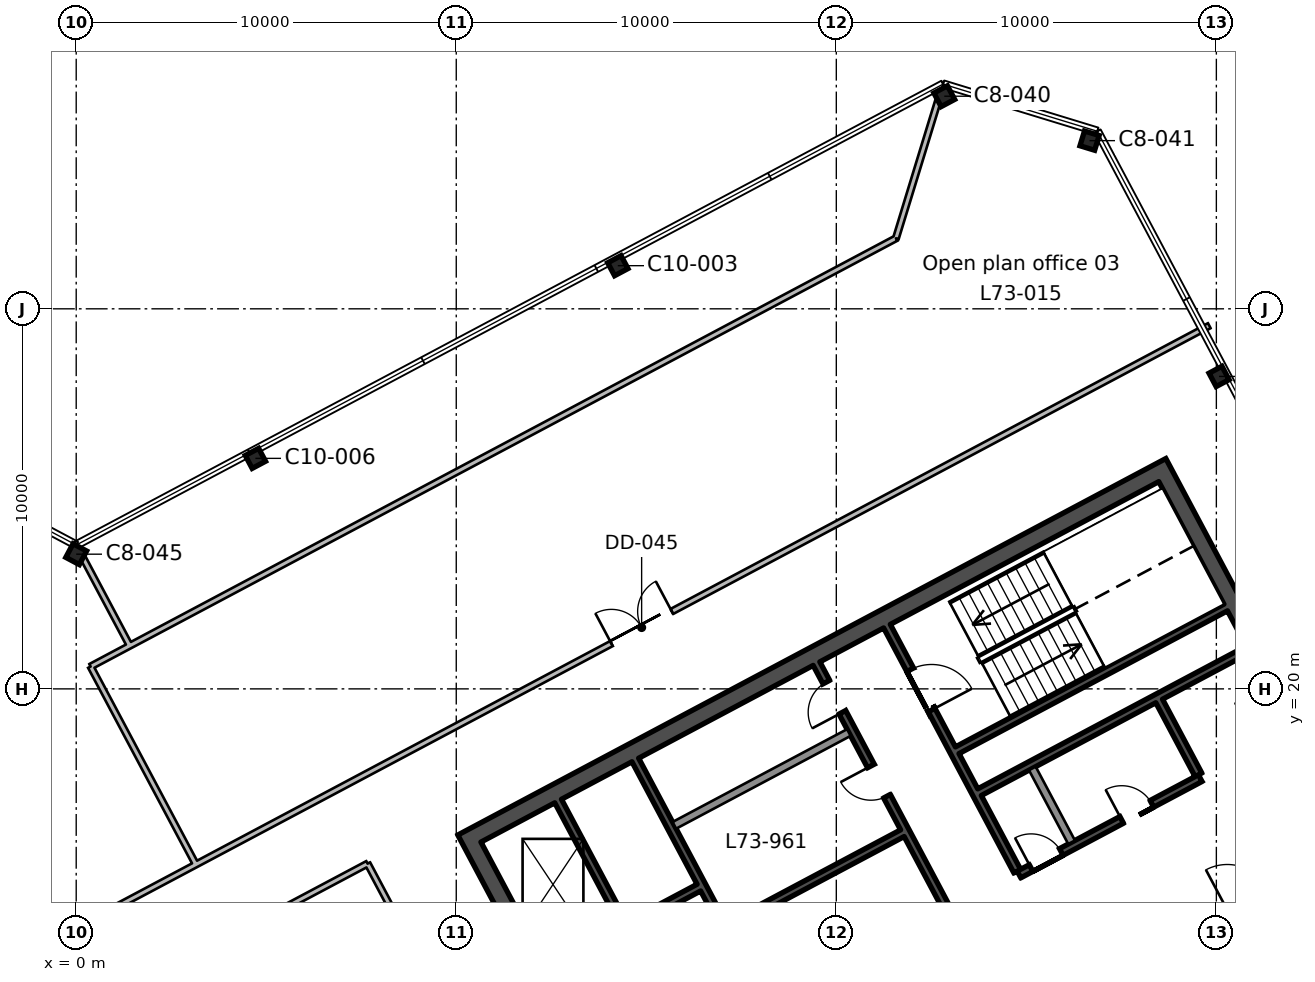
"""IFC4 building model, lengths in metres.
Left out: names, types, materials, properties, quantities, classifications, styles, units other than length and angle.
Written with IfcOpenShell. Run it as: python <this file> out.ifc"""

import sys

from ifc_helpers import new_model, si_unit, direction, frame, frame_2d, origin, origin_2d, place, context, subcontext, project, spatial, rectangle, i_section, extrude, element, fill, save


model = new_model("IFC4")
c1 = context("Model", 3, precision=1e-05, world=origin(), true_north=direction((0.0, 1.0)))
c2 = subcontext(c1, "Body", "Model", "MODEL_VIEW")
j1 = project(units=[si_unit("LENGTHUNIT", "METRE"), si_unit("PLANEANGLEUNIT", "RADIAN")], contexts=[c1])
p1 = place(None, origin())
s1 = spatial("IfcSite", under=j1, at=p1, CompositionType="ELEMENT")
p2 = place(p1, origin())
s2 = spatial("IfcBuilding", under=s1, at=p2, CompositionType="ELEMENT")
p3 = place(p2, frame((0.0, 0.0, 320.4)))
s3 = spatial("IfcBuildingStorey", under=s2, at=p3, CompositionType="ELEMENT", Elevation=320.4)
p4 = place(p3, frame((0.0, 23.544, 0.0), z_axis=(0.0, 0.0, 1.0), x_axis=(-0.882947592859, 0.469471562786, 0.0)))
e1 = element("IfcColumn", 1, at=p4, inside=s3, PredefinedType="COLUMN", context=c2, shape_type="SweptSolid", body=[
    extrude(i_section(OverallWidth=0.404, OverallDepth=0.406, WebThickness=0.027, FlangeThickness=0.044, FilletRadius=0.015, at=origin_2d()), origin(), (0.0, 0.0, 1.0), 3.9),
])
for number, where, z_axis, x_axis in (
    (2, (4.715, 26.065, 0.0), (0.0, 0.0, 1.0), (-0.883, -0.469, 0.0)),
    (3, (30.071, 28.221, 0.0), (0.0, 0.0, 1.0), (-0.469, 0.883, 0.0)),
    (4, (14.251, 31.135, 0.0), (0.0, 0.0, 1.0), (-0.883, -0.469, 0.0)),
):
    element("IfcColumn", number, at=place(p3, frame(where, z_axis=z_axis, x_axis=x_axis)), inside=s3, PredefinedType="COLUMN", context=c2, shape_type="SweptSolid", body=[
        extrude(i_section(OverallWidth=0.399, OverallDepth=0.386, WebThickness=0.021, FlangeThickness=0.033, FilletRadius=0.015, at=origin_2d()), origin(), (0.0, 0.0, 1.0), 3.9),
    ])
for number, where, z_axis, x_axis in (
    (5, (26.664, 34.425, 0.0), (0.0, 0.0, 1.0), (-0.956, 0.292, 0.0)),
    (6, (22.841, 35.594, 0.0), (0.0, 0.0, 1.0), (-0.883, -0.469, 0.0)),
):
    element("IfcColumn", number, at=place(p3, frame(where, z_axis=z_axis, x_axis=x_axis)), inside=s3, PredefinedType="COLUMN", context=c2, shape_type="SweptSolid", body=[
        extrude(i_section(OverallWidth=0.404, OverallDepth=0.406, WebThickness=0.027, FlangeThickness=0.044, FilletRadius=0.015, at=origin_2d()), origin(), (0.0, 0.0, 1.0), 3.9),
    ])
p5 = place(p3, frame((19.207, -0.604, 0.0), z_axis=(0.0, 0.0, 1.0), x_axis=(-0.469467968382, 0.882949504028, 0.0)))
e7 = element("IfcWall", 7, at=p5, inside=s3, PredefinedType="SHEAR", context=c2, shape_type="SweptSolid", body=[
    extrude(rectangle(XDim=19.1, YDim=0.45, at=frame_2d((9.55, 0.0))), origin(), (0.0, 0.0, 1.0), 3.9),
])
p6 = place(p5, frame((6.55, 0.0, 0.0)))
e8 = element("IfcOpeningElement", 8, at=p6, cuts=e7, PredefinedType="OPENING", context=c2, shape_type="SweptSolid", body=[
    extrude(rectangle(XDim=2.4, YDim=2.4, at=frame_2d((1.2, 1.2))), frame((0.0, 0.235, 0.0), z_axis=(0.0, -1.0, 0.0), x_axis=(1.0, 0.0, 0.0)), (0.0, 0.0, 1.0), 0.47),
])
p7 = place(p3, frame((37.439, 9.091, 0.0), z_axis=(0.0, 0.0, 1.0), x_axis=(-0.469467968382, 0.882949504028, 0.0)))
e9 = element("IfcWall", 9, at=p7, inside=s3, PredefinedType="SHEAR", context=c2, shape_type="SweptSolid", body=[
    extrude(rectangle(XDim=19.1, YDim=0.45, at=frame_2d((9.55, 0.0))), origin(), (0.0, 0.0, 1.0), 3.9),
])
p8 = place(p7, frame((10.15, 0.0, 0.0)))
e10 = element("IfcOpeningElement", 10, at=p8, cuts=e9, PredefinedType="OPENING", context=c2, shape_type="SweptSolid", body=[
    extrude(rectangle(XDim=2.4, YDim=2.4, at=frame_2d((1.2, 1.2))), frame((0.0, 0.235, 0.0), z_axis=(0.0, -1.0, 0.0), x_axis=(1.0, 0.0, 0.0)), (0.0, 0.0, 1.0), 0.47),
])
p9 = place(p3, frame((10.544, 16.167, 0.0), z_axis=(0.0, 0.0, 1.0), x_axis=(0.882947755831, 0.46947125628, 0.0)))
e11 = element("IfcWall", 11, at=p9, inside=s3, PredefinedType="SHEAR", context=c2, shape_type="SweptSolid", body=[
    extrude(rectangle(XDim=20.2, YDim=0.45, at=frame_2d((10.1, 0.0))), origin(), (0.0, 0.0, 1.0), 3.9),
])
p10 = place(p3, frame((14.394, 13.826, 0.0), z_axis=(0.0, 0.0, 1.0), x_axis=(-0.469494272526, 0.882935517501, 0.0)))
e12 = element("IfcWall", 12, at=p10, inside=s3, PredefinedType="SHEAR", context=c2, shape_type="SweptSolid", body=[
    extrude(rectangle(XDim=3.65, YDim=0.2, at=frame_2d((1.825, 0.0))), origin(), (0.0, 0.0, 1.0), 3.9),
])
p11 = place(p3, frame((18.138, 11.683, 0.0), z_axis=(0.0, 0.0, 1.0), x_axis=(-0.469480409012, 0.88294288918, 0.0)))
e13 = element("IfcWall", 13, at=p11, inside=s3, PredefinedType="SHEAR", context=c2, shape_type="SweptSolid", body=[
    extrude(rectangle(XDim=7.3, YDim=0.2, at=frame_2d((3.65, 0.0))), origin(), (0.0, 0.0, 1.0), 3.9),
])
p12 = place(p3, frame((19.569, 12.444, 0.0), z_axis=(0.0, 0.0, 1.0), x_axis=(-0.4694473164, 0.882960484464, 0.0)))
e14 = element("IfcWall", 14, at=p12, inside=s3, PredefinedType="SOLIDWALL", context=c2, shape_type="SweptSolid", body=[
    extrude(rectangle(XDim=2.2, YDim=0.2, at=frame_2d((1.1, 0.0))), origin(), (0.0, 0.0, 1.0), 3.9),
])
p13 = place(p3, frame((22.906, 14.218, 0.0), z_axis=(0.0, 0.0, 1.0), x_axis=(-0.469480409012, 0.88294288918, 0.0)))
e15 = element("IfcWall", 15, at=p13, inside=s3, PredefinedType="SHEAR", context=c2, shape_type="SweptSolid", body=[
    extrude(rectangle(XDim=7.3, YDim=0.2, at=frame_2d((3.65, 0.0))), origin(), (0.0, 0.0, 1.0), 3.9),
])
p14 = place(p13, frame((3.35, 0.0, 0.0)))
e16 = element("IfcOpeningElement", 16, at=p14, cuts=e15, PredefinedType="OPENING", context=c2, shape_type="SweptSolid", body=[
    extrude(rectangle(XDim=0.9, YDim=2.1, at=frame_2d((0.45, 1.05))), frame((0.0, 0.11, 0.0), z_axis=(0.0, -1.0, 0.0), x_axis=(1.0, 0.0, 0.0)), (0.0, 0.0, 1.0), 0.22),
])
p15 = place(p13, frame((5.85, 0.0, 0.0)))
e17 = element("IfcOpeningElement", 17, at=p15, cuts=e15, PredefinedType="OPENING", context=c2, shape_type="SweptSolid", body=[
    extrude(rectangle(XDim=0.9, YDim=2.1, at=frame_2d((0.45, 1.05))), frame((0.0, 0.11, 0.0), z_axis=(0.0, -1.0, 0.0), x_axis=(1.0, 0.0, 0.0)), (0.0, 0.0, 1.0), 0.22),
])
p16 = place(p3, frame((24.76, 15.204, 0.0), z_axis=(0.0, 0.0, 1.0), x_axis=(-0.469494272526, 0.882935517501, 0.0)))
e18 = element("IfcWall", 18, at=p16, inside=s3, PredefinedType="SHEAR", context=c2, shape_type="SweptSolid", body=[
    extrude(rectangle(XDim=7.3, YDim=0.2, at=frame_2d((3.65, 0.0))), origin(), (0.0, 0.0, 1.0), 3.9),
])
p17 = place(p16, frame((4.8, 0.0, 0.0)))
e19 = element("IfcOpeningElement", 19, at=p17, cuts=e18, PredefinedType="OPENING", context=c2, shape_type="SweptSolid", body=[
    extrude(rectangle(XDim=1.2, YDim=2.1, at=frame_2d((0.6, 1.05))), frame((0.0, 0.11, 0.0), z_axis=(0.0, -1.0, 0.0), x_axis=(1.0, 0.0, 0.0)), (0.0, 0.0, 1.0), 0.22),
])
p18 = place(p3, frame((26.191, 15.965, 0.0), z_axis=(0.0, 0.0, 1.0), x_axis=(-0.469533832133, 0.882914480843, 0.0)))
e20 = element("IfcWall", 20, at=p18, inside=s3, PredefinedType="SOLIDWALL", context=c2, shape_type="SweptSolid", body=[
    extrude(rectangle(XDim=2.2, YDim=0.2, at=frame_2d((1.1, 0.0))), origin(), (0.0, 0.0, 1.0), 3.9),
])
p19 = place(p3, frame((29.528, 17.739, 0.0), z_axis=(0.0, 0.0, 1.0), x_axis=(-0.469401318492, 0.882984938828, 0.0)))
e21 = element("IfcWall", 21, at=p19, inside=s3, PredefinedType="SHEAR", context=c2, shape_type="SweptSolid", body=[
    extrude(rectangle(XDim=2.2, YDim=0.2, at=frame_2d((1.1, 0.0))), origin(), (0.0, 0.0, 1.0), 3.9),
])
p20 = place(p3, frame((24.726, 11.222, 0.0), z_axis=(0.0, 0.0, 1.0), x_axis=(0.882940221191, 0.469485426614, 0.0)))
e22 = element("IfcWall", 22, at=p20, inside=s3, PredefinedType="SHEAR", context=c2, shape_type="SweptSolid", body=[
    extrude(rectangle(XDim=10.0, YDim=0.2, at=frame_2d((5.0, 0.0))), origin(), (0.0, 0.0, 1.0), 3.9),
])
p21 = place(p20, frame((6.3, 0.0, 0.0)))
e23 = element("IfcOpeningElement", 23, at=p21, cuts=e22, PredefinedType="OPENING", context=c2, shape_type="SweptSolid", body=[
    extrude(rectangle(XDim=1.2, YDim=2.1, at=frame_2d((0.6, 1.05))), frame((0.0, 0.11, 0.0), z_axis=(0.0, -1.0, 0.0), x_axis=(1.0, 0.0, 0.0)), (0.0, 0.0, 1.0), 0.22),
])
p22 = place(p20, frame((0.36, 0.0, 0.0)))
e24 = element("IfcOpeningElement", 24, at=p22, cuts=e22, PredefinedType="OPENING", context=c2, shape_type="SweptSolid", body=[
    extrude(rectangle(XDim=0.9, YDim=2.1, at=frame_2d((0.45, 1.05))), frame((0.0, 0.11, 0.0), z_axis=(0.0, -1.0, 0.0), x_axis=(1.0, 0.0, 0.0)), (0.0, 0.0, 1.0), 0.22),
])
p23 = place(p20, frame((3.06, 0.0, 0.0)))
e25 = element("IfcOpeningElement", 25, at=p23, cuts=e22, PredefinedType="OPENING", context=c2, shape_type="SweptSolid", body=[
    extrude(rectangle(XDim=0.9, YDim=2.1, at=frame_2d((0.45, 1.05))), frame((0.0, 0.11, 0.0), z_axis=(0.0, -1.0, 0.0), x_axis=(1.0, 0.0, 0.0)), (0.0, 0.0, 1.0), 0.22),
])
p24 = place(p3, frame((24.807, 15.116, 0.0), z_axis=(0.0, 0.0, 1.0), x_axis=(0.882942972946, 0.469480251476, 0.0)))
e26 = element("IfcWall", 26, at=p24, inside=s3, PredefinedType="SHEAR", context=c2, shape_type="SweptSolid", body=[
    extrude(rectangle(XDim=5.4, YDim=0.2, at=frame_2d((2.7, 0.0))), origin(), (0.0, 0.0, 1.0), 3.9),
])
p25 = place(p24, frame((0.36, 0.0, 0.0)))
e27 = element("IfcOpeningElement", 27, at=p25, cuts=e26, PredefinedType="OPENING", context=c2, shape_type="SweptSolid", body=[
    extrude(rectangle(XDim=0.9, YDim=2.1, at=frame_2d((0.45, 1.05))), frame((0.0, 0.11, 0.0), z_axis=(0.0, -1.0, 0.0), x_axis=(1.0, 0.0, 0.0)), (0.0, 0.0, 1.0), 0.22),
])
p26 = place(p24, frame((3.06, 0.0, 0.0)))
e28 = element("IfcOpeningElement", 28, at=p26, cuts=e26, PredefinedType="OPENING", context=c2, shape_type="SweptSolid", body=[
    extrude(rectangle(XDim=0.9, YDim=2.1, at=frame_2d((0.45, 1.05))), frame((0.0, 0.11, 0.0), z_axis=(0.0, -1.0, 0.0), x_axis=(1.0, 0.0, 0.0)), (0.0, 0.0, 1.0), 0.22),
])
p27 = place(p3, frame((17.147, 13.761, 0.0), z_axis=(0.0, 0.0, 1.0), x_axis=(0.882964314875, 0.469440111896, 0.0)))
e29 = element("IfcWall", 29, at=p27, inside=s3, PredefinedType="SHEAR", context=c2, shape_type="SweptSolid", body=[
    extrude(rectangle(XDim=5.2, YDim=0.2, at=frame_2d((2.6, 0.0))), origin(), (0.0, 0.0, 1.0), 3.9),
])
p28 = place(p3, frame((23.769, 17.282, 0.0), z_axis=(0.0, 0.0, 1.0), x_axis=(0.882940221191, 0.469485426614, 0.0)))
e30 = element("IfcWall", 30, at=p28, inside=s3, PredefinedType="SHEAR", context=c2, shape_type="SweptSolid", body=[
    extrude(rectangle(XDim=8.0, YDim=0.2, at=frame_2d((4.0, 0.0))), origin(), (0.0, 0.0, 1.0), 3.9),
])
p29 = place(p3, frame((12.41, 12.658, 0.0), z_axis=(0.0, 0.0, 1.0), x_axis=(0.8829484765, 0.469469900894, 0.0)))
e31 = element("IfcWall", 31, at=p29, inside=s3, PredefinedType="SHEAR", context=c2, shape_type="SweptSolid", body=[
    extrude(rectangle(XDim=4.5, YDim=0.2, at=frame_2d((2.25, 0.0))), origin(), (0.0, 0.0, 1.0), 3.9),
])
p30 = place(p29, frame((0.6, 0.0, 0.0)))
e32 = element("IfcOpeningElement", 32, at=p30, cuts=e31, PredefinedType="OPENING", context=c2, shape_type="SweptSolid", body=[
    extrude(rectangle(XDim=1.1, YDim=2.1, at=frame_2d((0.55, 1.05))), frame((0.0, 0.11, 0.0), z_axis=(0.0, -1.0, 0.0), x_axis=(1.0, 0.0, 0.0)), (0.0, 0.0, 1.0), 0.22),
])
p31 = place(p3, frame((23.182, 18.385, 0.0), z_axis=(0.0, 0.0, 1.0), x_axis=(0.88295287151, 0.469461634952, 0.0)))
e33 = element("IfcWall", 33, at=p31, inside=s3, PredefinedType="SHEAR", context=c2, shape_type="SweptSolid", body=[
    extrude(rectangle(XDim=8.0, YDim=0.2, at=frame_2d((4.0, 0.0))), origin(), (0.0, 0.0, 1.0), 3.9),
])
p32 = place(p3, frame((15.739, 16.409, 0.0), z_axis=(0.0, 0.0, 1.0), x_axis=(0.882934506056, 0.469496174655, 0.0)))
e34 = element("IfcWall", 34, at=p32, inside=s3, PredefinedType="SOLIDWALL", context=c2, shape_type="SweptSolid", body=[
    extrude(rectangle(XDim=5.2, YDim=0.2, at=frame_2d((2.6, 0.0))), origin(), (0.0, 0.0, 1.0), 3.9),
])
p33 = place(p3, frame((-48.947, 39.73, 0.0), z_axis=(0.0, 0.0, 1.0), x_axis=(0.882945454821, -0.469475583828, 0.0)))
e35 = element("IfcWall", 35, at=p33, inside=s3, PredefinedType="PARTITIONING", context=c2, shape_type="SweptSolid", body=[
    extrude(rectangle(XDim=55.436, YDim=0.15, at=frame_2d((27.718, 0.0))), origin(), (0.0, 0.0, 1.0), 3.54),
])
p34 = place(p33, frame((28.35, 0.0, 0.0)))
e36 = element("IfcOpeningElement", 36, at=p34, cuts=e35, PredefinedType="OPENING", context=c2, shape_type="SweptSolid", body=[
    extrude(rectangle(XDim=1.8, YDim=2.1, at=frame_2d((0.9, 1.05))), frame((0.0, 0.085, 0.0), z_axis=(0.0, -1.0, 0.0), x_axis=(1.0, 0.0, 0.0)), (0.0, 0.0, 1.0), 0.17),
])
p35 = place(p33, frame((26.7, 0.0, 0.0)))
e37 = element("IfcOpeningElement", 37, at=p35, cuts=e35, PredefinedType="OPENING", context=c2, shape_type="SweptSolid", body=[
    extrude(rectangle(XDim=1.0, YDim=2.1, at=frame_2d((0.5, 1.05))), frame((0.0, 0.085, 0.0), z_axis=(0.0, -1.0, 0.0), x_axis=(1.0, 0.0, 0.0)), (0.0, 0.0, 1.0), 0.17),
])
p36 = place(p33, frame((15.65, 0.0, 0.0)))
e38 = element("IfcOpeningElement", 38, at=p36, cuts=e35, PredefinedType="OPENING", context=c2, shape_type="SweptSolid", body=[
    extrude(rectangle(XDim=1.0, YDim=2.1, at=frame_2d((0.5, 1.05))), frame((0.0, 0.085, 0.0), z_axis=(0.0, -1.0, 0.0), x_axis=(1.0, 0.0, 0.0)), (0.0, 0.0, 1.0), 0.17),
])
p37 = place(p3, frame((0.0, 13.704, 0.0), z_axis=(0.0, 0.0, 1.0), x_axis=(0.882954463269, 0.469458641196, 0.0)))
e39 = element("IfcWall", 39, at=p37, inside=s3, PredefinedType="PARTITIONING", context=c2, shape_type="SweptSolid", body=[
    extrude(rectangle(XDim=33.766, YDim=0.15, at=frame_2d((16.883, 0.0))), origin(), (0.0, 0.0, 1.0), 3.54),
])
p38 = place(p37, frame((15.95, 0.0, 0.0)))
e40 = element("IfcOpeningElement", 40, at=p38, cuts=e39, PredefinedType="OPENING", context=c2, shape_type="SweptSolid", body=[
    extrude(rectangle(XDim=1.8, YDim=2.1, at=frame_2d((0.9, 1.05))), frame((0.0, 0.085, 0.0), z_axis=(0.0, -1.0, 0.0), x_axis=(1.0, 0.0, 0.0)), (0.0, 0.0, 1.0), 0.17),
])
p39 = place(p3, frame((2.487, 16.624, 0.0), z_axis=(0.0, 0.0, 1.0), x_axis=(0.469087751625, -0.883151561894, 0.0)))
e41 = element("IfcWall", 41, at=p39, inside=s3, PredefinedType="PARTITIONING", context=c2, shape_type="SweptSolid", body=[
    extrude(rectangle(XDim=1.411, YDim=0.15, at=frame_2d((0.706, 0.0))), origin(), (0.0, 0.0, 1.0), 3.54),
])
p40 = place(p3, frame((0.178, 23.45, 0.0), z_axis=(0.0, 0.0, 1.0), x_axis=(0.469495603372, -0.882934809833, 0.0)))
e42 = element("IfcWall", 42, at=p40, inside=s3, PredefinedType="PARTITIONING", context=c2, shape_type="SweptSolid", body=[
    extrude(rectangle(XDim=2.622, YDim=0.15, at=frame_2d((1.311, 0.0))), origin(), (0.0, 0.0, 1.0), 3.54),
])
p41 = place(p3, frame((1.405, 21.133, 0.0), z_axis=(0.0, 0.0, 1.0), x_axis=(0.882938487938, 0.46948868625, 0.0)))
e43 = element("IfcWall", 43, at=p41, inside=s3, PredefinedType="PARTITIONING", context=c2, shape_type="SweptSolid", body=[
    extrude(rectangle(XDim=22.837, YDim=0.15, at=frame_2d((11.419, 0.0))), origin(), (0.0, 0.0, 1.0), 3.54),
])
p42 = place(p3, frame((21.569, 31.855, 0.0), z_axis=(0.0, 0.0, 1.0), x_axis=(0.292806976968, 0.956171571549, 0.0)))
e44 = element("IfcWall", 44, at=p42, inside=s3, PredefinedType="PARTITIONING", context=c2, shape_type="SweptSolid", body=[
    extrude(rectangle(XDim=3.784, YDim=0.15, at=frame_2d((1.892, 0.0))), origin(), (0.0, 0.0, 1.0), 3.54),
])
p43 = place(p3, frame((2.487, 16.624, 0.0), z_axis=(0.0, 0.0, 1.0), x_axis=(-0.469563370993, 0.882898771447, 0.0)))
e45 = element("IfcWall", 45, at=p43, inside=s3, PredefinedType="PARTITIONING", context=c2, shape_type="SweptSolid", body=[
    extrude(rectangle(XDim=4.49, YDim=0.15, at=frame_2d((2.245, 0.0))), origin(), (0.0, 0.0, 1.0), 3.54),
])
p44 = place(p3, frame((1.405, 21.133, 0.0), z_axis=(0.0, 0.0, 1.0), x_axis=(-0.882753784089, -0.469835882704, 0.0)))
e46 = element("IfcWall", 46, at=p44, inside=s3, PredefinedType="PARTITIONING", context=c2, shape_type="SweptSolid", body=[
    extrude(rectangle(XDim=1.162, YDim=0.15, at=frame_2d((0.581, 0.0))), origin(), (0.0, 0.0, 1.0), 3.54),
])
p45 = place(p3, frame((8.625, 13.6, 0.0), z_axis=(0.0, 0.0, 1.0), x_axis=(-0.469420518513, 0.882974731688, 0.0)))
e47 = element("IfcWall", 47, at=p45, inside=s3, PredefinedType="PARTITIONING", context=c2, shape_type="SweptSolid", body=[
    extrude(rectangle(XDim=2.041, YDim=0.15, at=frame_2d((1.021, 0.0))), origin(), (0.0, 0.0, 1.0), 3.54),
])
p46 = place(p3, frame((7.667, 15.402, 0.0), z_axis=(0.0, 0.0, 1.0), x_axis=(-0.882994654303, -0.469383042378, 0.0)))
e48 = element("IfcWall", 48, at=p46, inside=s3, PredefinedType="PARTITIONING", context=c2, shape_type="SweptSolid", body=[
    extrude(rectangle(XDim=3.839, YDim=0.15, at=frame_2d((1.919, 0.0))), origin(), (0.0, 0.0, 1.0), 3.54),
])
p47 = place(p21, origin())
e49 = element("IfcDoor", 49, at=p47, inside=s3, OperationType="SINGLE_SWING_LEFT", PredefinedType="DOOR", context=c2, shape_type="SweptSolid", body=[
    extrude(rectangle(XDim=1.2, YDim=2.1, at=frame_2d((0.6, 1.05))), frame((0.0, 0.025, 0.0), z_axis=(0.0, -1.0, 0.0), x_axis=(1.0, 0.0, 0.0)), (0.0, 0.0, 1.0), 0.05),
])
fill(e23, e49)
p48 = place(p17, frame((1.2, 0.0, 0.0), z_axis=(0.0, 0.0, 1.0), x_axis=(-1.0, 0.0, 0.0)))
e50 = element("IfcDoor", 50, at=p48, inside=s3, OperationType="SINGLE_SWING_RIGHT", PredefinedType="DOOR", context=c2, shape_type="SweptSolid", body=[
    extrude(rectangle(XDim=1.2, YDim=2.1, at=frame_2d((0.6, 1.05))), frame((0.0, 0.025, 0.0), z_axis=(0.0, -1.0, 0.0), x_axis=(1.0, 0.0, 0.0)), (0.0, 0.0, 1.0), 0.05),
])
fill(e19, e50)
p49 = place(p25, origin())
e51 = element("IfcDoor", 51, at=p49, inside=s3, OperationType="SINGLE_SWING_LEFT", PredefinedType="DOOR", context=c2, shape_type="SweptSolid", body=[
    extrude(rectangle(XDim=0.9, YDim=2.1, at=frame_2d((0.45, 1.05))), frame((0.0, 0.025, 0.0), z_axis=(0.0, -1.0, 0.0), x_axis=(1.0, 0.0, 0.0)), (0.0, 0.0, 1.0), 0.05),
])
fill(e27, e51)
p50 = place(p26, origin())
e52 = element("IfcDoor", 52, at=p50, inside=s3, OperationType="SINGLE_SWING_LEFT", PredefinedType="DOOR", context=c2, shape_type="SweptSolid", body=[
    extrude(rectangle(XDim=0.9, YDim=2.1, at=frame_2d((0.45, 1.05))), frame((0.0, 0.025, 0.0), z_axis=(0.0, -1.0, 0.0), x_axis=(1.0, 0.0, 0.0)), (0.0, 0.0, 1.0), 0.05),
])
fill(e28, e52)
p51 = place(p14, origin())
e53 = element("IfcDoor", 53, at=p51, inside=s3, OperationType="SINGLE_SWING_RIGHT", PredefinedType="DOOR", context=c2, shape_type="SweptSolid", body=[
    extrude(rectangle(XDim=0.9, YDim=2.1, at=frame_2d((0.45, 1.05))), frame((0.0, 0.025, 0.0), z_axis=(0.0, -1.0, 0.0), x_axis=(1.0, 0.0, 0.0)), (0.0, 0.0, 1.0), 0.05),
])
fill(e16, e53)
p52 = place(p15, origin())
e54 = element("IfcDoor", 54, at=p52, inside=s3, OperationType="SINGLE_SWING_LEFT", PredefinedType="DOOR", context=c2, shape_type="SweptSolid", body=[
    extrude(rectangle(XDim=0.9, YDim=2.1, at=frame_2d((0.45, 1.05))), frame((0.0, 0.025, 0.0), z_axis=(0.0, -1.0, 0.0), x_axis=(1.0, 0.0, 0.0)), (0.0, 0.0, 1.0), 0.05),
])
fill(e17, e54)
p53 = place(p38, origin())
e55 = element("IfcDoor", 55, at=p53, inside=s3, OperationType="DOUBLE_DOOR_SINGLE_SWING", PredefinedType="DOOR", context=c2, shape_type="SweptSolid", body=[
    extrude(rectangle(XDim=1.8, YDim=2.1, at=frame_2d((0.9, 1.05))), frame((0.0, 0.025, 0.0), z_axis=(0.0, -1.0, 0.0), x_axis=(1.0, 0.0, 0.0)), (0.0, 0.0, 1.0), 0.05),
])
fill(e40, e55)
save(model, sys.argv[1])
